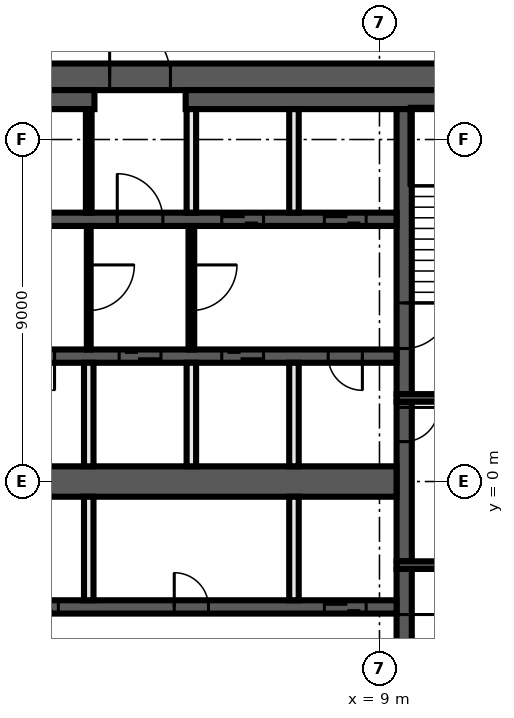
"""IFC4 building model, lengths in metres.
Left out: names, types, materials, properties, quantities, classifications, styles, units other than length and angle.
Written with IfcOpenShell. Run it as: python <this file> out.ifc"""

import sys

from ifc_helpers import new_model, si_unit, direction, frame, frame_2d, origin, place, context, subcontext, project, spatial, rectangle, extrude, element, fill, save


model = new_model("IFC4")
c1 = context("Model", 3, precision=1e-05, world=origin(), true_north=direction((0.0, 1.0)))
c2 = subcontext(c1, "Body", "Model", "MODEL_VIEW")
j1 = project(units=[si_unit("LENGTHUNIT", "METRE"), si_unit("PLANEANGLEUNIT", "RADIAN")], contexts=[c1])
p1 = place(None, origin())
s1 = spatial("IfcSite", under=j1, at=p1, CompositionType="ELEMENT")
p2 = place(p1, origin())
s2 = spatial("IfcBuilding", under=s1, at=p2, CompositionType="ELEMENT")
p3 = place(p2, frame((0.0, 0.0, 274.8)))
s3 = spatial("IfcBuildingStorey", under=s2, at=p3, CompositionType="ELEMENT", Elevation=274.8)
p4 = place(p3, frame((-14.0, 10.65, 0.0), z_axis=(0.0, 0.0, 1.0), x_axis=(1.0, 0.0, 0.0)))
e1 = element("IfcWall", 1, at=p4, inside=s3, PredefinedType="SHEAR", context=c2, shape_type="SweptSolid", body=[
    extrude(rectangle(XDim=28.0, YDim=0.7, at=frame_2d((14.0, 0.0))), origin(), (0.0, 0.0, 1.0), 3.82),
])
p5 = place(p4, frame((15.9, 0.0, 0.0)))
e2 = element("IfcOpeningElement", 2, at=p5, cuts=e1, PredefinedType="OPENING", context=c2, shape_type="SweptSolid", body=[
    extrude(rectangle(XDim=1.6, YDim=2.1, at=frame_2d((0.8, 1.05))), frame((0.0, 0.36, 0.0), z_axis=(0.0, -1.0, 0.0), x_axis=(1.0, 0.0, 0.0)), (0.0, 0.0, 1.0), 0.72),
])
p6 = place(p3, frame((-13.3, 10.05, 0.0), z_axis=(0.0, 0.0, 1.0), x_axis=(1.0, 0.0, 0.0)))
e3 = element("IfcWall", 3, at=p6, inside=s3, PredefinedType="SHEAR", context=c2, shape_type="SweptSolid", body=[
    extrude(rectangle(XDim=14.8, YDim=0.5, at=frame_2d((7.4, 0.0))), origin(), (0.0, 0.0, 1.0), 3.82),
])
p7 = place(p3, frame((3.9, 10.05, 0.0), z_axis=(0.0, 0.0, 1.0), x_axis=(1.0, 0.0, 0.0)))
e4 = element("IfcWall", 4, at=p7, inside=s3, PredefinedType="SHEAR", context=c2, shape_type="SweptSolid", body=[
    extrude(rectangle(XDim=9.4, YDim=0.5, at=frame_2d((4.7, 0.0))), origin(), (0.0, 0.0, 1.0), 3.82),
])
p8 = place(p3, frame((9.65, -2.3, 0.0), z_axis=(0.0, 0.0, 1.0), x_axis=(0.0, -1.0, 0.0)))
e5 = element("IfcWall", 5, at=p8, inside=s3, PredefinedType="SHEAR", context=c2, shape_type="SweptSolid", body=[
    extrude(rectangle(XDim=7.5, YDim=0.4, at=frame_2d((3.75, 0.0))), origin(), (0.0, 0.0, 1.0), 3.82),
])
p9 = place(p8, frame((1.2, 0.0, 0.0)))
e6 = element("IfcOpeningElement", 6, at=p9, cuts=e5, PredefinedType="OPENING", context=c2, shape_type="SweptSolid", body=[
    extrude(rectangle(XDim=1.2, YDim=2.1, at=frame_2d((0.6, 1.05))), frame((0.0, 0.21, 0.0), z_axis=(0.0, -1.0, 0.0), x_axis=(1.0, 0.0, 0.0)), (0.0, 0.0, 1.0), 0.42),
])
p10 = place(p3, frame((9.65, 2.1, 0.0), z_axis=(0.0, 0.0, 1.0), x_axis=(0.0, -1.0, 0.0)))
e7 = element("IfcWall", 7, at=p10, inside=s3, PredefinedType="SHEAR", context=c2, shape_type="SweptSolid", body=[
    extrude(rectangle(XDim=4.2, YDim=0.4, at=frame_2d((2.1, 0.0))), origin(), (0.0, 0.0, 1.0), 3.82),
])
p11 = place(p10, frame((0.15, 0.0, 0.0)))
e8 = element("IfcOpeningElement", 8, at=p11, cuts=e7, PredefinedType="OPENING", context=c2, shape_type="SweptSolid", body=[
    extrude(rectangle(XDim=0.9, YDim=2.1, at=frame_2d((0.45, 1.05))), frame((0.0, 0.21, 0.0), z_axis=(0.0, -1.0, 0.0), x_axis=(1.0, 0.0, 0.0)), (0.0, 0.0, 1.0), 0.42),
])
p12 = place(p3, frame((9.65, 9.8, 0.0), z_axis=(0.0, 0.0, 1.0), x_axis=(0.0, -1.0, 0.0)))
e9 = element("IfcWall", 9, at=p12, inside=s3, PredefinedType="SHEAR", context=c2, shape_type="SweptSolid", body=[
    extrude(rectangle(XDim=7.5, YDim=0.4, at=frame_2d((3.75, 0.0))), origin(), (0.0, 0.0, 1.0), 3.82),
])
p13 = place(p12, frame((5.1, 0.0, 0.0)))
e10 = element("IfcOpeningElement", 10, at=p13, cuts=e9, PredefinedType="OPENING", context=c2, shape_type="SweptSolid", body=[
    extrude(rectangle(XDim=1.2, YDim=2.1, at=frame_2d((0.6, 1.05))), frame((0.0, 0.21, 0.0), z_axis=(0.0, -1.0, 0.0), x_axis=(1.0, 0.0, 0.0)), (0.0, 0.0, 1.0), 0.42),
])
for number, where, z_axis, x_axis in (
    (11, (9.45, 2.2, 0.0), (0.0, 0.0, 1.0), (1.0, 0.0, 0.0)),
    (12, (9.45, -2.2, 0.0), (0.0, 0.0, 1.0), (1.0, 0.0, 0.0)),
):
    element("IfcWall", number, at=place(p3, frame(where, z_axis=z_axis, x_axis=x_axis)), inside=s3, PredefinedType="SHEAR", context=c2, shape_type="SweptSolid", body=[
        extrude(rectangle(XDim=3.35, YDim=0.2, at=frame_2d((1.675, 0.0))), origin(), (0.0, 0.0, 1.0), 3.82),
    ])
p14 = place(p3, frame((-9.45, 6.9, 0.0), z_axis=(0.0, 0.0, 1.0), x_axis=(1.0, 0.0, 0.0)))
e13 = element("IfcWall", 13, at=p14, inside=s3, PredefinedType="SHEAR", context=c2, shape_type="SweptSolid", body=[
    extrude(rectangle(XDim=18.9, YDim=0.35, at=frame_2d((9.45, 0.0))), origin(), (0.0, 0.0, 1.0), 3.82),
])
p15 = place(p14, frame((11.55, 0.0, 0.0)))
e14 = element("IfcOpeningElement", 14, at=p15, cuts=e13, PredefinedType="OPENING", context=c2, shape_type="SweptSolid", body=[
    extrude(rectangle(XDim=1.2, YDim=2.1, at=frame_2d((0.6, 1.05))), frame((0.0, 0.185, 0.0), z_axis=(0.0, -1.0, 0.0), x_axis=(1.0, 0.0, 0.0)), (0.0, 0.0, 1.0), 0.37),
])
p16 = place(p14, frame((14.3, 0.0, 0.0)))
e15 = element("IfcOpeningElement", 15, at=p16, cuts=e13, PredefinedType="OPENING", context=c2, shape_type="SweptSolid", body=[
    extrude(rectangle(XDim=1.1, YDim=2.1, at=frame_2d((0.55, 1.05))), frame((0.0, 0.185, 0.0), z_axis=(0.0, -1.0, 0.0), x_axis=(1.0, 0.0, 0.0)), (0.0, 0.0, 1.0), 0.37),
])
p17 = place(p14, frame((17.0, 0.0, 0.0)))
e16 = element("IfcOpeningElement", 16, at=p17, cuts=e13, PredefinedType="OPENING", context=c2, shape_type="SweptSolid", body=[
    extrude(rectangle(XDim=1.1, YDim=2.1, at=frame_2d((0.55, 1.05))), frame((0.0, 0.185, 0.0), z_axis=(0.0, -1.0, 0.0), x_axis=(1.0, 0.0, 0.0)), (0.0, 0.0, 1.0), 0.37),
])
p18 = place(p14, frame((2.25, 0.0, 0.0)))
e17 = element("IfcOpeningElement", 17, at=p18, cuts=e13, PredefinedType="OPENING", context=c2, shape_type="SweptSolid", body=[
    extrude(rectangle(XDim=0.9, YDim=2.1, at=frame_2d((0.45, 1.05))), frame((0.0, 0.185, 0.0), z_axis=(0.0, -1.0, 0.0), x_axis=(1.0, 0.0, 0.0)), (0.0, 0.0, 1.0), 0.37),
])
p19 = place(p14, frame((7.65, 0.0, 0.0)))
e18 = element("IfcOpeningElement", 18, at=p19, cuts=e13, PredefinedType="OPENING", context=c2, shape_type="SweptSolid", body=[
    extrude(rectangle(XDim=0.9, YDim=2.1, at=frame_2d((0.45, 1.05))), frame((0.0, 0.185, 0.0), z_axis=(0.0, -1.0, 0.0), x_axis=(1.0, 0.0, 0.0)), (0.0, 0.0, 1.0), 0.37),
])
p20 = place(p3, frame((9.45, 3.3, 0.0), z_axis=(0.0, 0.0, 1.0), x_axis=(-1.0, 0.0, 0.0)))
e19 = element("IfcWall", 19, at=p20, inside=s3, PredefinedType="SHEAR", context=c2, shape_type="SweptSolid", body=[
    extrude(rectangle(XDim=18.9, YDim=0.35, at=frame_2d((9.45, 0.0))), origin(), (0.0, 0.0, 1.0), 3.82),
])
p21 = place(p20, frame((6.2, 0.0, 0.0)))
e20 = element("IfcOpeningElement", 20, at=p21, cuts=e19, PredefinedType="OPENING", context=c2, shape_type="SweptSolid", body=[
    extrude(rectangle(XDim=1.1, YDim=2.1, at=frame_2d((0.55, 1.05))), frame((0.0, 0.185, 0.0), z_axis=(0.0, -1.0, 0.0), x_axis=(1.0, 0.0, 0.0)), (0.0, 0.0, 1.0), 0.37),
])
p22 = place(p20, frame((3.5, 0.0, 0.0)))
e21 = element("IfcOpeningElement", 21, at=p22, cuts=e19, PredefinedType="OPENING", context=c2, shape_type="SweptSolid", body=[
    extrude(rectangle(XDim=1.1, YDim=2.1, at=frame_2d((0.55, 1.05))), frame((0.0, 0.185, 0.0), z_axis=(0.0, -1.0, 0.0), x_axis=(1.0, 0.0, 0.0)), (0.0, 0.0, 1.0), 0.37),
])
p23 = place(p20, frame((0.9, 0.0, 0.0)))
e22 = element("IfcOpeningElement", 22, at=p23, cuts=e19, PredefinedType="OPENING", context=c2, shape_type="SweptSolid", body=[
    extrude(rectangle(XDim=0.9, YDim=2.1, at=frame_2d((0.45, 1.05))), frame((0.0, 0.185, 0.0), z_axis=(0.0, -1.0, 0.0), x_axis=(1.0, 0.0, 0.0)), (0.0, 0.0, 1.0), 0.37),
])
p24 = place(p20, frame((17.1, 0.0, 0.0)))
e23 = element("IfcOpeningElement", 23, at=p24, cuts=e19, PredefinedType="OPENING", context=c2, shape_type="SweptSolid", body=[
    extrude(rectangle(XDim=0.9, YDim=2.1, at=frame_2d((0.45, 1.05))), frame((0.0, 0.185, 0.0), z_axis=(0.0, -1.0, 0.0), x_axis=(1.0, 0.0, 0.0)), (0.0, 0.0, 1.0), 0.37),
])
p25 = place(p20, frame((14.4, 0.0, 0.0)))
e24 = element("IfcOpeningElement", 24, at=p25, cuts=e19, PredefinedType="OPENING", context=c2, shape_type="SweptSolid", body=[
    extrude(rectangle(XDim=0.9, YDim=2.1, at=frame_2d((0.45, 1.05))), frame((0.0, 0.185, 0.0), z_axis=(0.0, -1.0, 0.0), x_axis=(1.0, 0.0, 0.0)), (0.0, 0.0, 1.0), 0.37),
])
p26 = place(p20, frame((11.7, 0.0, 0.0)))
e25 = element("IfcOpeningElement", 25, at=p26, cuts=e19, PredefinedType="OPENING", context=c2, shape_type="SweptSolid", body=[
    extrude(rectangle(XDim=0.9, YDim=2.1, at=frame_2d((0.45, 1.05))), frame((0.0, 0.185, 0.0), z_axis=(0.0, -1.0, 0.0), x_axis=(1.0, 0.0, 0.0)), (0.0, 0.0, 1.0), 0.37),
])
p27 = place(p20, frame((9.0, 0.0, 0.0)))
e26 = element("IfcOpeningElement", 26, at=p27, cuts=e19, PredefinedType="OPENING", context=c2, shape_type="SweptSolid", body=[
    extrude(rectangle(XDim=0.9, YDim=2.1, at=frame_2d((0.45, 1.05))), frame((0.0, 0.185, 0.0), z_axis=(0.0, -1.0, 0.0), x_axis=(1.0, 0.0, 0.0)), (0.0, 0.0, 1.0), 0.37),
])
p28 = place(p3, frame((-9.45, -3.3, 0.0), z_axis=(0.0, 0.0, 1.0), x_axis=(1.0, 0.0, 0.0)))
e27 = element("IfcWall", 27, at=p28, inside=s3, PredefinedType="SHEAR", context=c2, shape_type="SweptSolid", body=[
    extrude(rectangle(XDim=18.9, YDim=0.35, at=frame_2d((9.45, 0.0))), origin(), (0.0, 0.0, 1.0), 3.82),
])
p29 = place(p28, frame((0.8, 0.0, 0.0)))
e28 = element("IfcOpeningElement", 28, at=p29, cuts=e27, PredefinedType="OPENING", context=c2, shape_type="SweptSolid", body=[
    extrude(rectangle(XDim=1.1, YDim=2.1, at=frame_2d((0.55, 1.05))), frame((0.0, 0.185, 0.0), z_axis=(0.0, -1.0, 0.0), x_axis=(1.0, 0.0, 0.0)), (0.0, 0.0, 1.0), 0.37),
])
p30 = place(p28, frame((3.5, 0.0, 0.0)))
e29 = element("IfcOpeningElement", 29, at=p30, cuts=e27, PredefinedType="OPENING", context=c2, shape_type="SweptSolid", body=[
    extrude(rectangle(XDim=1.1, YDim=2.1, at=frame_2d((0.55, 1.05))), frame((0.0, 0.185, 0.0), z_axis=(0.0, -1.0, 0.0), x_axis=(1.0, 0.0, 0.0)), (0.0, 0.0, 1.0), 0.37),
])
p31 = place(p28, frame((6.2, 0.0, 0.0)))
e30 = element("IfcOpeningElement", 30, at=p31, cuts=e27, PredefinedType="OPENING", context=c2, shape_type="SweptSolid", body=[
    extrude(rectangle(XDim=1.1, YDim=2.1, at=frame_2d((0.55, 1.05))), frame((0.0, 0.185, 0.0), z_axis=(0.0, -1.0, 0.0), x_axis=(1.0, 0.0, 0.0)), (0.0, 0.0, 1.0), 0.37),
])
p32 = place(p28, frame((8.9, 0.0, 0.0)))
e31 = element("IfcOpeningElement", 31, at=p32, cuts=e27, PredefinedType="OPENING", context=c2, shape_type="SweptSolid", body=[
    extrude(rectangle(XDim=1.1, YDim=2.1, at=frame_2d((0.55, 1.05))), frame((0.0, 0.185, 0.0), z_axis=(0.0, -1.0, 0.0), x_axis=(1.0, 0.0, 0.0)), (0.0, 0.0, 1.0), 0.37),
])
p33 = place(p28, frame((17.0, 0.0, 0.0)))
e32 = element("IfcOpeningElement", 32, at=p33, cuts=e27, PredefinedType="OPENING", context=c2, shape_type="SweptSolid", body=[
    extrude(rectangle(XDim=1.1, YDim=2.1, at=frame_2d((0.55, 1.05))), frame((0.0, 0.185, 0.0), z_axis=(0.0, -1.0, 0.0), x_axis=(1.0, 0.0, 0.0)), (0.0, 0.0, 1.0), 0.37),
])
p34 = place(p28, frame((13.05, 0.0, 0.0)))
e33 = element("IfcOpeningElement", 33, at=p34, cuts=e27, PredefinedType="OPENING", context=c2, shape_type="SweptSolid", body=[
    extrude(rectangle(XDim=0.9, YDim=2.1, at=frame_2d((0.45, 1.05))), frame((0.0, 0.185, 0.0), z_axis=(0.0, -1.0, 0.0), x_axis=(1.0, 0.0, 0.0)), (0.0, 0.0, 1.0), 0.37),
])
p35 = place(p3, frame((-9.45, 0.0, 0.0), z_axis=(0.0, 0.0, 1.0), x_axis=(1.0, 0.0, 0.0)))
e34 = element("IfcWall", 34, at=p35, inside=s3, PredefinedType="SHEAR", context=c2, shape_type="SweptSolid", body=[
    extrude(rectangle(XDim=18.9, YDim=0.8, at=frame_2d((9.45, 0.0))), origin(), (0.0, 0.0, 1.0), 3.82),
])
for number, where, z_axis, x_axis in (
    (35, (6.75, -3.125, 0.0), (0.0, 0.0, 1.0), (0.0, 1.0, 0.0)),
    (36, (6.75, 0.4, 0.0), (0.0, 0.0, 1.0), (0.0, 1.0, 0.0)),
    (37, (6.75, 7.075, 0.0), (0.0, 0.0, 1.0), (0.0, 1.0, 0.0)),
):
    element("IfcWall", number, at=place(p3, frame(where, z_axis=z_axis, x_axis=x_axis)), inside=s3, PredefinedType="SOLIDWALL", context=c2, shape_type="SweptSolid", body=[
        extrude(rectangle(XDim=2.725, YDim=0.25, at=frame_2d((1.363, 0.0))), origin(), (0.0, 0.0, 1.0), 3.82),
    ])
p36 = place(p3, frame((4.05, 6.725, 0.0), z_axis=(0.0, 0.0, 1.0), x_axis=(0.0, -1.0, 0.0)))
e38 = element("IfcWall", 38, at=p36, inside=s3, PredefinedType="PARTITIONING", context=c2, shape_type="SweptSolid", body=[
    extrude(rectangle(XDim=3.25, YDim=0.15, at=frame_2d((1.625, 0.0))), origin(), (0.0, 0.0, 1.0), 3.82),
])
p37 = place(p36, frame((1.025, 0.0, 0.0)))
e39 = element("IfcOpeningElement", 39, at=p37, cuts=e38, PredefinedType="OPENING", context=c2, shape_type="SweptSolid", body=[
    extrude(rectangle(XDim=1.2, YDim=2.1, at=frame_2d((0.6, 1.05))), frame((0.0, 0.085, 0.0), z_axis=(0.0, -1.0, 0.0), x_axis=(1.0, 0.0, 0.0)), (0.0, 0.0, 1.0), 0.17),
])
for number, where, z_axis, x_axis in (
    (40, (4.05, 0.4, 0.0), (0.0, 0.0, 1.0), (0.0, 1.0, 0.0)),
    (41, (4.05, 7.075, 0.0), (0.0, 0.0, 1.0), (0.0, 1.0, 0.0)),
):
    element("IfcWall", number, at=place(p3, frame(where, z_axis=z_axis, x_axis=x_axis)), inside=s3, PredefinedType="SOLIDWALL", context=c2, shape_type="SweptSolid", body=[
        extrude(rectangle(XDim=2.725, YDim=0.25, at=frame_2d((1.363, 0.0))), origin(), (0.0, 0.0, 1.0), 3.82),
    ])
p38 = place(p3, frame((1.35, 7.075, 0.0), z_axis=(0.0, 0.0, 1.0), x_axis=(0.0, 1.0, 0.0)))
e42 = element("IfcWall", 42, at=p38, inside=s3, PredefinedType="PARTITIONING", context=c2, shape_type="SweptSolid", body=[
    extrude(rectangle(XDim=2.725, YDim=0.15, at=frame_2d((1.363, 0.0))), origin(), (0.0, 0.0, 1.0), 3.82),
])
p39 = place(p3, frame((1.35, 6.725, 0.0), z_axis=(0.0, 0.0, 1.0), x_axis=(0.0, -1.0, 0.0)))
e43 = element("IfcWall", 43, at=p39, inside=s3, PredefinedType="PARTITIONING", context=c2, shape_type="SweptSolid", body=[
    extrude(rectangle(XDim=3.25, YDim=0.1, at=frame_2d((1.625, 0.0))), origin(), (0.0, 0.0, 1.0), 3.82),
])
p40 = place(p39, frame((1.025, 0.0, 0.0)))
e44 = element("IfcOpeningElement", 44, at=p40, cuts=e43, PredefinedType="OPENING", context=c2, shape_type="SweptSolid", body=[
    extrude(rectangle(XDim=1.2, YDim=2.1, at=frame_2d((0.6, 1.05))), frame((0.0, 0.06, 0.0), z_axis=(0.0, -1.0, 0.0), x_axis=(1.0, 0.0, 0.0)), (0.0, 0.0, 1.0), 0.12),
])
for number, where, z_axis, x_axis in (
    (45, (1.35, -3.125, 0.0), (0.0, 0.0, 1.0), (0.0, 1.0, 0.0)),
    (46, (1.35, 0.4, 0.0), (0.0, 0.0, 1.0), (0.0, 1.0, 0.0)),
):
    element("IfcWall", number, at=place(p3, frame(where, z_axis=z_axis, x_axis=x_axis)), inside=s3, PredefinedType="SOLIDWALL", context=c2, shape_type="SweptSolid", body=[
        extrude(rectangle(XDim=2.725, YDim=0.25, at=frame_2d((1.363, 0.0))), origin(), (0.0, 0.0, 1.0), 3.82),
    ])
p41 = place(p11, origin())
e47 = element("IfcDoor", 47, at=p41, inside=s3, OperationType="SINGLE_SWING_RIGHT", PredefinedType="DOOR", context=c2, shape_type="SweptSolid", body=[
    extrude(rectangle(XDim=0.9, YDim=2.1, at=frame_2d((0.45, 1.05))), frame((0.0, 0.025, 0.0), z_axis=(0.0, -1.0, 0.0), x_axis=(1.0, 0.0, 0.0)), (0.0, 0.0, 1.0), 0.05),
])
fill(e8, e47)
p42 = place(p5, origin())
e48 = element("IfcDoor", 48, at=p42, inside=s3, OperationType="DOUBLE_DOOR_SINGLE_SWING", PredefinedType="DOOR", context=c2, shape_type="SweptSolid", body=[
    extrude(rectangle(XDim=1.6, YDim=2.1, at=frame_2d((0.8, 1.05))), frame((0.0, 0.025, 0.0), z_axis=(0.0, -1.0, 0.0), x_axis=(1.0, 0.0, 0.0)), (0.0, 0.0, 1.0), 0.05),
])
fill(e2, e48)
p43 = place(p15, origin())
e49 = element("IfcDoor", 49, at=p43, inside=s3, OperationType="SINGLE_SWING_LEFT", PredefinedType="DOOR", context=c2, shape_type="SweptSolid", body=[
    extrude(rectangle(XDim=1.2, YDim=2.1, at=frame_2d((0.6, 1.05))), frame((0.0, 0.025, 0.0), z_axis=(0.0, -1.0, 0.0), x_axis=(1.0, 0.0, 0.0)), (0.0, 0.0, 1.0), 0.05),
])
fill(e14, e49)
p44 = place(p16, origin())
e50 = element("IfcDoor", 50, at=p44, inside=s3, OperationType="DOUBLE_DOOR_SLIDING", PredefinedType="DOOR", context=c2, shape_type="SweptSolid", body=[
    extrude(rectangle(XDim=1.1, YDim=2.1, at=frame_2d((0.55, 1.05))), frame((0.0, 0.025, 0.0), z_axis=(0.0, -1.0, 0.0), x_axis=(1.0, 0.0, 0.0)), (0.0, 0.0, 1.0), 0.05),
])
fill(e15, e50)
p45 = place(p17, origin())
e51 = element("IfcDoor", 51, at=p45, inside=s3, OperationType="DOUBLE_DOOR_SLIDING", PredefinedType="DOOR", context=c2, shape_type="SweptSolid", body=[
    extrude(rectangle(XDim=1.1, YDim=2.1, at=frame_2d((0.55, 1.05))), frame((0.0, 0.025, 0.0), z_axis=(0.0, -1.0, 0.0), x_axis=(1.0, 0.0, 0.0)), (0.0, 0.0, 1.0), 0.05),
])
fill(e16, e51)
p46 = place(p21, origin())
e52 = element("IfcDoor", 52, at=p46, inside=s3, OperationType="DOUBLE_DOOR_SLIDING", PredefinedType="DOOR", context=c2, shape_type="SweptSolid", body=[
    extrude(rectangle(XDim=1.1, YDim=2.1, at=frame_2d((0.55, 1.05))), frame((0.0, 0.025, 0.0), z_axis=(0.0, -1.0, 0.0), x_axis=(1.0, 0.0, 0.0)), (0.0, 0.0, 1.0), 0.05),
])
fill(e20, e52)
p47 = place(p22, origin())
e53 = element("IfcDoor", 53, at=p47, inside=s3, OperationType="DOUBLE_DOOR_SLIDING", PredefinedType="DOOR", context=c2, shape_type="SweptSolid", body=[
    extrude(rectangle(XDim=1.1, YDim=2.1, at=frame_2d((0.55, 1.05))), frame((0.0, 0.025, 0.0), z_axis=(0.0, -1.0, 0.0), x_axis=(1.0, 0.0, 0.0)), (0.0, 0.0, 1.0), 0.05),
])
fill(e21, e53)
p48 = place(p23, origin())
e54 = element("IfcDoor", 54, at=p48, inside=s3, OperationType="SINGLE_SWING_LEFT", PredefinedType="DOOR", context=c2, shape_type="SweptSolid", body=[
    extrude(rectangle(XDim=0.9, YDim=2.1, at=frame_2d((0.45, 1.05))), frame((0.0, 0.025, 0.0), z_axis=(0.0, -1.0, 0.0), x_axis=(1.0, 0.0, 0.0)), (0.0, 0.0, 1.0), 0.05),
])
fill(e22, e54)
p49 = place(p32, origin())
e55 = element("IfcDoor", 55, at=p49, inside=s3, OperationType="DOUBLE_DOOR_SLIDING", PredefinedType="DOOR", context=c2, shape_type="SweptSolid", body=[
    extrude(rectangle(XDim=1.1, YDim=2.1, at=frame_2d((0.55, 1.05))), frame((0.0, 0.025, 0.0), z_axis=(0.0, -1.0, 0.0), x_axis=(1.0, 0.0, 0.0)), (0.0, 0.0, 1.0), 0.05),
])
fill(e31, e55)
p50 = place(p33, origin())
e56 = element("IfcDoor", 56, at=p50, inside=s3, OperationType="DOUBLE_DOOR_SLIDING", PredefinedType="DOOR", context=c2, shape_type="SweptSolid", body=[
    extrude(rectangle(XDim=1.1, YDim=2.1, at=frame_2d((0.55, 1.05))), frame((0.0, 0.025, 0.0), z_axis=(0.0, -1.0, 0.0), x_axis=(1.0, 0.0, 0.0)), (0.0, 0.0, 1.0), 0.05),
])
fill(e32, e56)
p51 = place(p27, origin())
e57 = element("IfcDoor", 57, at=p51, inside=s3, OperationType="SINGLE_SWING_LEFT", PredefinedType="DOOR", context=c2, shape_type="SweptSolid", body=[
    extrude(rectangle(XDim=0.9, YDim=2.1, at=frame_2d((0.45, 1.05))), frame((0.0, 0.025, 0.0), z_axis=(0.0, -1.0, 0.0), x_axis=(1.0, 0.0, 0.0)), (0.0, 0.0, 1.0), 0.05),
])
fill(e26, e57)
p52 = place(p34, origin())
e58 = element("IfcDoor", 58, at=p52, inside=s3, OperationType="SINGLE_SWING_RIGHT", PredefinedType="DOOR", context=c2, shape_type="SweptSolid", body=[
    extrude(rectangle(XDim=0.9, YDim=2.1, at=frame_2d((0.45, 1.05))), frame((0.0, 0.025, 0.0), z_axis=(0.0, -1.0, 0.0), x_axis=(1.0, 0.0, 0.0)), (0.0, 0.0, 1.0), 0.05),
])
fill(e33, e58)
p53 = place(p13, origin())
e59 = element("IfcDoor", 59, at=p53, inside=s3, OperationType="SINGLE_SWING_LEFT", PredefinedType="DOOR", context=c2, shape_type="SweptSolid", body=[
    extrude(rectangle(XDim=1.2, YDim=2.1, at=frame_2d((0.6, 1.05))), frame((0.0, 0.025, 0.0), z_axis=(0.0, -1.0, 0.0), x_axis=(1.0, 0.0, 0.0)), (0.0, 0.0, 1.0), 0.05),
])
fill(e10, e59)
p54 = place(p9, origin())
e60 = element("IfcDoor", 60, at=p54, inside=s3, OperationType="SINGLE_SWING_RIGHT", PredefinedType="DOOR", context=c2, shape_type="SweptSolid", body=[
    extrude(rectangle(XDim=1.2, YDim=2.1, at=frame_2d((0.6, 1.05))), frame((0.0, 0.025, 0.0), z_axis=(0.0, -1.0, 0.0), x_axis=(1.0, 0.0, 0.0)), (0.0, 0.0, 1.0), 0.05),
])
fill(e6, e60)
p55 = place(p40, origin())
e61 = element("IfcDoor", 61, at=p55, inside=s3, OperationType="SINGLE_SWING_LEFT", PredefinedType="DOOR", context=c2, shape_type="SweptSolid", body=[
    extrude(rectangle(XDim=1.2, YDim=2.1, at=frame_2d((0.6, 1.05))), frame((0.0, 0.025, 0.0), z_axis=(0.0, -1.0, 0.0), x_axis=(1.0, 0.0, 0.0)), (0.0, 0.0, 1.0), 0.05),
])
fill(e44, e61)
p56 = place(p37, origin())
e62 = element("IfcDoor", 62, at=p56, inside=s3, OperationType="SINGLE_SWING_RIGHT", PredefinedType="DOOR", context=c2, shape_type="SweptSolid", body=[
    extrude(rectangle(XDim=1.2, YDim=2.1, at=frame_2d((0.6, 1.05))), frame((0.0, 0.025, 0.0), z_axis=(0.0, -1.0, 0.0), x_axis=(1.0, 0.0, 0.0)), (0.0, 0.0, 1.0), 0.05),
])
fill(e39, e62)
save(model, sys.argv[1])
